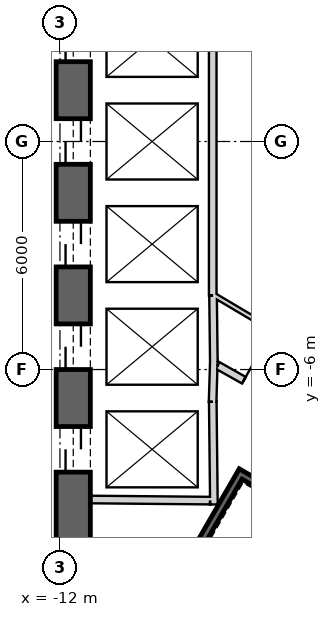
"""IFC4 building model, lengths in metres.
Left out: names, types, materials, properties, quantities, classifications, styles, units other than length and angle.
Written with IfcOpenShell. Run it as: python <this file> out.ifc"""

import sys

from ifc_helpers import new_model, si_unit, direction, frame, frame_2d, origin, place, context, subcontext, project, spatial, rectangle, extrude, element, fill, save


model = new_model("IFC4")
c1 = context("Model", 3, precision=1e-05, world=origin(), true_north=direction((0.0, 1.0)))
c2 = subcontext(c1, "Body", "Model", "MODEL_VIEW")
j1 = project(units=[si_unit("LENGTHUNIT", "METRE"), si_unit("PLANEANGLEUNIT", "RADIAN")], contexts=[c1])
p1 = place(None, origin())
s1 = spatial("IfcSite", under=j1, at=p1, CompositionType="ELEMENT")
p2 = place(p1, origin())
s2 = spatial("IfcBuilding", under=s1, at=p2, CompositionType="ELEMENT")
p3 = place(p2, frame((0.0, 0.0, 265.2)))
s3 = spatial("IfcBuildingStorey", under=s2, at=p3, CompositionType="ELEMENT", Elevation=265.2)
p4 = place(p3, frame((19.475, 2.208, 0.0), z_axis=(0.0, 0.0, 1.0), x_axis=(-0.866028369851, 0.499994862586, 0.0)))
e1 = element("IfcWall", 1, at=p4, inside=s3, PredefinedType="SHEAR", context=c2, shape_type="SweptSolid", body=[
    extrude(rectangle(XDim=31.523, YDim=0.9, at=frame_2d((15.762, 0.0))), origin(), (0.0, 0.0, 1.0), 4.0),
])
p5 = place(p4, frame((7.062, 0.0, 0.0)))
e2 = element("IfcOpeningElement", 2, at=p5, cuts=e1, PredefinedType="OPENING", context=c2, shape_type="SweptSolid", body=[
    extrude(rectangle(XDim=1.2, YDim=2.4, at=frame_2d((0.6, 1.2))), frame((0.0, 0.46, 0.0), z_axis=(0.0, -1.0, 0.0), x_axis=(1.0, 0.0, 0.0)), (0.0, 0.0, 1.0), 0.92),
])
p6 = place(p4, frame((3.612, 0.0, 0.0)))
e3 = element("IfcOpeningElement", 3, at=p6, cuts=e1, PredefinedType="OPENING", context=c2, shape_type="SweptSolid", body=[
    extrude(rectangle(XDim=1.2, YDim=2.4, at=frame_2d((0.6, 1.2))), frame((0.0, 0.46, 0.0), z_axis=(0.0, -1.0, 0.0), x_axis=(1.0, 0.0, 0.0)), (0.0, 0.0, 1.0), 0.92),
])
p7 = place(p4, frame((26.712, 0.0, 0.0)))
e4 = element("IfcOpeningElement", 4, at=p7, cuts=e1, PredefinedType="OPENING", context=c2, shape_type="SweptSolid", body=[
    extrude(rectangle(XDim=1.2, YDim=2.4, at=frame_2d((0.6, 1.2))), frame((0.0, 0.46, 0.0), z_axis=(0.0, -1.0, 0.0), x_axis=(1.0, 0.0, 0.0)), (0.0, 0.0, 1.0), 0.92),
])
p8 = place(p3, frame((-11.65, 15.762, 0.0), z_axis=(0.0, 0.0, 1.0), x_axis=(0.0, -1.0, 0.0)))
e5 = element("IfcWall", 5, at=p8, inside=s3, PredefinedType="SHEAR", context=c2, shape_type="SweptSolid", body=[
    extrude(rectangle(XDim=31.523, YDim=0.9, at=frame_2d((15.762, 0.0))), origin(), (0.0, 0.0, 1.0), 4.0),
])
p9 = place(p8, frame((7.062, 0.0, 0.0)))
e6 = element("IfcOpeningElement", 6, at=p9, cuts=e5, PredefinedType="OPENING", context=c2, shape_type="SweptSolid", body=[
    extrude(rectangle(XDim=1.2, YDim=2.4, at=frame_2d((0.6, 1.2))), frame((0.0, 0.46, 0.0), z_axis=(0.0, -1.0, 0.0), x_axis=(1.0, 0.0, 0.0)), (0.0, 0.0, 1.0), 0.92),
])
p10 = place(p8, frame((9.762, 0.0, 0.0)))
e7 = element("IfcOpeningElement", 7, at=p10, cuts=e5, PredefinedType="OPENING", context=c2, shape_type="SweptSolid", body=[
    extrude(rectangle(XDim=1.2, YDim=2.4, at=frame_2d((0.6, 1.2))), frame((0.0, 0.46, 0.0), z_axis=(0.0, -1.0, 0.0), x_axis=(1.0, 0.0, 0.0)), (0.0, 0.0, 1.0), 0.92),
])
p11 = place(p8, frame((12.462, 0.0, 0.0)))
e8 = element("IfcOpeningElement", 8, at=p11, cuts=e5, PredefinedType="OPENING", context=c2, shape_type="SweptSolid", body=[
    extrude(rectangle(XDim=1.2, YDim=2.4, at=frame_2d((0.6, 1.2))), frame((0.0, 0.46, 0.0), z_axis=(0.0, -1.0, 0.0), x_axis=(1.0, 0.0, 0.0)), (0.0, 0.0, 1.0), 0.92),
])
p12 = place(p8, frame((15.162, 0.0, 0.0)))
e9 = element("IfcOpeningElement", 9, at=p12, cuts=e5, PredefinedType="OPENING", context=c2, shape_type="SweptSolid", body=[
    extrude(rectangle(XDim=1.2, YDim=2.4, at=frame_2d((0.6, 1.2))), frame((0.0, 0.46, 0.0), z_axis=(0.0, -1.0, 0.0), x_axis=(1.0, 0.0, 0.0)), (0.0, 0.0, 1.0), 0.92),
])
p13 = place(p8, frame((17.862, 0.0, 0.0)))
e10 = element("IfcOpeningElement", 10, at=p13, cuts=e5, PredefinedType="OPENING", context=c2, shape_type="SweptSolid", body=[
    extrude(rectangle(XDim=1.2, YDim=2.4, at=frame_2d((0.6, 1.2))), frame((0.0, 0.46, 0.0), z_axis=(0.0, -1.0, 0.0), x_axis=(1.0, 0.0, 0.0)), (0.0, 0.0, 1.0), 0.92),
])
p14 = place(p8, frame((20.562, 0.0, 0.0)))
e11 = element("IfcOpeningElement", 11, at=p14, cuts=e5, PredefinedType="OPENING", context=c2, shape_type="SweptSolid", body=[
    extrude(rectangle(XDim=1.2, YDim=2.4, at=frame_2d((0.6, 1.2))), frame((0.0, 0.46, 0.0), z_axis=(0.0, -1.0, 0.0), x_axis=(1.0, 0.0, 0.0)), (0.0, 0.0, 1.0), 0.92),
])
p15 = place(p8, frame((23.262, 0.0, 0.0)))
e12 = element("IfcOpeningElement", 12, at=p15, cuts=e5, PredefinedType="OPENING", context=c2, shape_type="SweptSolid", body=[
    extrude(rectangle(XDim=1.2, YDim=2.4, at=frame_2d((0.6, 1.2))), frame((0.0, 0.46, 0.0), z_axis=(0.0, -1.0, 0.0), x_axis=(1.0, 0.0, 0.0)), (0.0, 0.0, 1.0), 0.92),
])
p16 = place(p8, frame((3.612, 0.0, 0.0)))
e13 = element("IfcOpeningElement", 13, at=p16, cuts=e5, PredefinedType="OPENING", context=c2, shape_type="SweptSolid", body=[
    extrude(rectangle(XDim=1.2, YDim=2.4, at=frame_2d((0.6, 1.2))), frame((0.0, 0.46, 0.0), z_axis=(0.0, -1.0, 0.0), x_axis=(1.0, 0.0, 0.0)), (0.0, 0.0, 1.0), 0.92),
])
p17 = place(p8, frame((26.712, 0.0, 0.0)))
e14 = element("IfcOpeningElement", 14, at=p17, cuts=e5, PredefinedType="OPENING", context=c2, shape_type="SweptSolid", body=[
    extrude(rectangle(XDim=1.2, YDim=2.4, at=frame_2d((0.6, 1.2))), frame((0.0, 0.46, 0.0), z_axis=(0.0, -1.0, 0.0), x_axis=(1.0, 0.0, 0.0)), (0.0, 0.0, 1.0), 0.92),
])
p18 = place(p3, frame((-7.825, -17.97, 0.0), z_axis=(0.0, 0.0, 1.0), x_axis=(0.866028369851, 0.499994862586, 0.0)))
e15 = element("IfcWall", 15, at=p18, inside=s3, PredefinedType="SHEAR", context=c2, shape_type="SweptSolid", body=[
    extrude(rectangle(XDim=31.523, YDim=0.9, at=frame_2d((15.762, 0.0))), origin(), (0.0, 0.0, 1.0), 4.0),
])
p19 = place(p18, frame((7.062, 0.0, 0.0)))
e16 = element("IfcOpeningElement", 16, at=p19, cuts=e15, PredefinedType="OPENING", context=c2, shape_type="SweptSolid", body=[
    extrude(rectangle(XDim=1.2, YDim=2.4, at=frame_2d((0.6, 1.2))), frame((0.0, 0.46, 0.0), z_axis=(0.0, -1.0, 0.0), x_axis=(1.0, 0.0, 0.0)), (0.0, 0.0, 1.0), 0.92),
])
p20 = place(p18, frame((9.762, 0.0, 0.0)))
e17 = element("IfcOpeningElement", 17, at=p20, cuts=e15, PredefinedType="OPENING", context=c2, shape_type="SweptSolid", body=[
    extrude(rectangle(XDim=1.2, YDim=2.4, at=frame_2d((0.6, 1.2))), frame((0.0, 0.46, 0.0), z_axis=(0.0, -1.0, 0.0), x_axis=(1.0, 0.0, 0.0)), (0.0, 0.0, 1.0), 0.92),
])
p21 = place(p18, frame((12.462, 0.0, 0.0)))
e18 = element("IfcOpeningElement", 18, at=p21, cuts=e15, PredefinedType="OPENING", context=c2, shape_type="SweptSolid", body=[
    extrude(rectangle(XDim=1.2, YDim=2.4, at=frame_2d((0.6, 1.2))), frame((0.0, 0.46, 0.0), z_axis=(0.0, -1.0, 0.0), x_axis=(1.0, 0.0, 0.0)), (0.0, 0.0, 1.0), 0.92),
])
p22 = place(p18, frame((15.162, 0.0, 0.0)))
e19 = element("IfcOpeningElement", 19, at=p22, cuts=e15, PredefinedType="OPENING", context=c2, shape_type="SweptSolid", body=[
    extrude(rectangle(XDim=1.2, YDim=2.4, at=frame_2d((0.6, 1.2))), frame((0.0, 0.46, 0.0), z_axis=(0.0, -1.0, 0.0), x_axis=(1.0, 0.0, 0.0)), (0.0, 0.0, 1.0), 0.92),
])
p23 = place(p18, frame((17.862, 0.0, 0.0)))
e20 = element("IfcOpeningElement", 20, at=p23, cuts=e15, PredefinedType="OPENING", context=c2, shape_type="SweptSolid", body=[
    extrude(rectangle(XDim=1.2, YDim=2.4, at=frame_2d((0.6, 1.2))), frame((0.0, 0.46, 0.0), z_axis=(0.0, -1.0, 0.0), x_axis=(1.0, 0.0, 0.0)), (0.0, 0.0, 1.0), 0.92),
])
p24 = place(p18, frame((20.562, 0.0, 0.0)))
e21 = element("IfcOpeningElement", 21, at=p24, cuts=e15, PredefinedType="OPENING", context=c2, shape_type="SweptSolid", body=[
    extrude(rectangle(XDim=1.2, YDim=2.4, at=frame_2d((0.6, 1.2))), frame((0.0, 0.46, 0.0), z_axis=(0.0, -1.0, 0.0), x_axis=(1.0, 0.0, 0.0)), (0.0, 0.0, 1.0), 0.92),
])
p25 = place(p18, frame((26.712, 0.0, 0.0)))
e22 = element("IfcOpeningElement", 22, at=p25, cuts=e15, PredefinedType="OPENING", context=c2, shape_type="SweptSolid", body=[
    extrude(rectangle(XDim=1.2, YDim=2.4, at=frame_2d((0.6, 1.2))), frame((0.0, 0.46, 0.0), z_axis=(0.0, -1.0, 0.0), x_axis=(1.0, 0.0, 0.0)), (0.0, 0.0, 1.0), 0.92),
])
p26 = place(p18, frame((3.612, 0.0, 0.0)))
e23 = element("IfcOpeningElement", 23, at=p26, cuts=e15, PredefinedType="OPENING", context=c2, shape_type="SweptSolid", body=[
    extrude(rectangle(XDim=1.2, YDim=2.4, at=frame_2d((0.6, 1.2))), frame((0.0, 0.46, 0.0), z_axis=(0.0, -1.0, 0.0), x_axis=(1.0, 0.0, 0.0)), (0.0, 0.0, 1.0), 0.92),
])
p27 = place(p3, frame((-7.98, 4.05, 0.0), z_axis=(0.0, 0.0, 1.0), x_axis=(0.0, -1.0, 0.0)))
e24 = element("IfcWall", 24, at=p27, inside=s3, PredefinedType="PLUMBINGWALL", context=c2, shape_type="SweptSolid", body=[
    extrude(rectangle(XDim=8.1, YDim=0.2, at=frame_2d((4.05, 0.0))), origin(), (0.0, 0.0, 1.0), 3.7),
])
p28 = place(p3, frame((-7.95, -5.772, 0.0), z_axis=(0.0, 0.0, 1.0), x_axis=(-0.030803413295, -0.999525462272, 0.0)))
e25 = element("IfcWall", 25, at=p28, inside=s3, PredefinedType="PLUMBINGWALL", context=c2, shape_type="SweptSolid", body=[
    extrude(rectangle(XDim=1.078, YDim=0.2, at=frame_2d((0.539, 0.0))), origin(), (0.0, 0.0, 1.0), 3.7),
])
p29 = place(p3, frame((-7.971, -4.05, 0.0), z_axis=(0.0, 0.0, 1.0), x_axis=(0.012042535896, -0.999927486035, 0.0)))
e26 = element("IfcWall", 26, at=p29, inside=s3, PredefinedType="PLUMBINGWALL", context=c2, shape_type="SweptSolid", body=[
    extrude(rectangle(XDim=1.845, YDim=0.2, at=frame_2d((0.922, 0.0))), origin(), (0.0, 0.0, 1.0), 3.7),
])
p30 = place(p3, frame((-7.979, -6.85, 0.0), z_axis=(0.0, 0.0, 1.0), x_axis=(0.011121475088, -0.999938154483, 0.0)))
e27 = element("IfcWall", 27, at=p30, inside=s3, PredefinedType="PLUMBINGWALL", context=c2, shape_type="SweptSolid", body=[
    extrude(rectangle(XDim=2.7, YDim=0.2, at=frame_2d((1.35, 0.0))), origin(), (0.0, 0.0, 1.0), 3.7),
])
p31 = place(p3, frame((-8.05, -9.449, 0.0), z_axis=(0.0, 0.0, 1.0), x_axis=(-0.999957467379, 0.009222983926, 0.0)))
e28 = element("IfcWall", 28, at=p31, inside=s3, PredefinedType="PLUMBINGWALL", context=c2, shape_type="SweptSolid", body=[
    extrude(rectangle(XDim=3.15, YDim=0.2, at=frame_2d((1.575, 0.0))), origin(), (0.0, 0.0, 1.0), 3.7),
])
p32 = place(p3, frame((-7.196, -8.663, -0.3), z_axis=(0.0, 0.0, 1.0), x_axis=(-0.499997992926, -0.866026562566, 0.0)))
e29 = element("IfcWall", 29, at=p32, inside=s3, PredefinedType="SHEAR", context=c2, shape_type="SweptSolid", body=[
    extrude(rectangle(XDim=7.9, YDim=0.2, at=frame_2d((3.95, 0.0))), origin(), (0.0, 0.0, 1.0), 4.0),
])
p33 = place(p3, frame((-4.041, -10.599, -0.3), z_axis=(0.0, 0.0, 1.0), x_axis=(-0.866047807691, 0.499961193289, 0.0)))
e30 = element("IfcWall", 30, at=p33, inside=s3, PredefinedType="SHEAR", context=c2, shape_type="SweptSolid", body=[
    extrude(rectangle(XDim=3.6, YDim=0.2, at=frame_2d((1.8, 0.0))), origin(), (0.0, 0.0, 1.0), 4.0),
])
p34 = place(p33, frame((1.25, 0.0, 0.3)))
e31 = element("IfcOpeningElement", 31, at=p34, cuts=e30, PredefinedType="OPENING", context=c2, shape_type="SweptSolid", body=[
    extrude(rectangle(XDim=1.1, YDim=2.1, at=frame_2d((0.55, 1.05))), frame((0.0, 0.11, 0.0), z_axis=(0.0, -1.0, 0.0), x_axis=(1.0, 0.0, 0.0)), (0.0, 0.0, 1.0), 0.22),
])
p35 = place(p3, frame((-7.849, -5.894, 0.0), z_axis=(0.0, 0.0, 1.0), x_axis=(0.871363259478, -0.490638431059, 0.0)))
e32 = element("IfcWall", 32, at=p35, inside=s3, PredefinedType="PARTITIONING", context=c2, shape_type="SweptSolid", body=[
    extrude(rectangle(XDim=2.581, YDim=0.2, at=frame_2d((1.291, 0.0))), origin(), (0.0, 0.0, 1.0), 3.7),
])
p36 = place(p35, frame((0.791, 0.0, 0.0)))
e33 = element("IfcOpeningElement", 33, at=p36, cuts=e32, PredefinedType="OPENING", context=c2, shape_type="SweptSolid", body=[
    extrude(rectangle(XDim=1.0, YDim=2.1, at=frame_2d((0.5, 1.05))), frame((0.0, 0.11, 0.0), z_axis=(0.0, -1.0, 0.0), x_axis=(1.0, 0.0, 0.0)), (0.0, 0.0, 1.0), 0.22),
])
p37 = place(p3, frame((-7.95, -4.041, 0.0), z_axis=(0.0, 0.0, 1.0), x_axis=(0.860112457103, -0.510104461004, 0.0)))
e34 = element("IfcWall", 34, at=p37, inside=s3, PredefinedType="PARTITIONING", context=c2, shape_type="SweptSolid", body=[
    extrude(rectangle(XDim=2.104, YDim=0.12, at=frame_2d((1.052, 0.0))), origin(), (0.0, 0.0, 1.0), 3.7),
])
p38 = place(p36, origin())
e35 = element("IfcDoor", 35, at=p38, inside=s3, OperationType="SINGLE_SWING_RIGHT", PredefinedType="USERDEFINED", context=c2, shape_type="SweptSolid", body=[
    extrude(rectangle(XDim=1.0, YDim=2.1, at=frame_2d((0.5, 1.05))), frame((0.0, 0.025, 0.0), z_axis=(0.0, -1.0, 0.0), x_axis=(1.0, 0.0, 0.0)), (0.0, 0.0, 1.0), 0.05),
])
fill(e33, e35)
p39 = place(p11, origin())
e36 = element("IfcDoor", 36, at=p39, inside=s3, OperationType="SLIDING_TO_LEFT", PredefinedType="USERDEFINED", context=c2, shape_type="SweptSolid", body=[
    extrude(rectangle(XDim=1.2, YDim=2.4, at=frame_2d((0.6, 1.2))), frame((0.0, 0.025, 0.0), z_axis=(0.0, -1.0, 0.0), x_axis=(1.0, 0.0, 0.0)), (0.0, 0.0, 1.0), 0.05),
])
fill(e8, e36)
p40 = place(p12, origin())
e37 = element("IfcDoor", 37, at=p40, inside=s3, OperationType="SLIDING_TO_LEFT", PredefinedType="USERDEFINED", context=c2, shape_type="SweptSolid", body=[
    extrude(rectangle(XDim=1.2, YDim=2.4, at=frame_2d((0.6, 1.2))), frame((0.0, 0.025, 0.0), z_axis=(0.0, -1.0, 0.0), x_axis=(1.0, 0.0, 0.0)), (0.0, 0.0, 1.0), 0.05),
])
fill(e9, e37)
p41 = place(p13, origin())
e38 = element("IfcDoor", 38, at=p41, inside=s3, OperationType="SLIDING_TO_LEFT", PredefinedType="USERDEFINED", context=c2, shape_type="SweptSolid", body=[
    extrude(rectangle(XDim=1.2, YDim=2.4, at=frame_2d((0.6, 1.2))), frame((0.0, 0.025, 0.0), z_axis=(0.0, -1.0, 0.0), x_axis=(1.0, 0.0, 0.0)), (0.0, 0.0, 1.0), 0.05),
])
fill(e10, e38)
p42 = place(p14, origin())
e39 = element("IfcDoor", 39, at=p42, inside=s3, OperationType="SLIDING_TO_LEFT", PredefinedType="USERDEFINED", context=c2, shape_type="SweptSolid", body=[
    extrude(rectangle(XDim=1.2, YDim=2.4, at=frame_2d((0.6, 1.2))), frame((0.0, 0.025, 0.0), z_axis=(0.0, -1.0, 0.0), x_axis=(1.0, 0.0, 0.0)), (0.0, 0.0, 1.0), 0.05),
])
fill(e11, e39)
p43 = place(p15, origin())
e40 = element("IfcDoor", 40, at=p43, inside=s3, OperationType="SLIDING_TO_LEFT", PredefinedType="USERDEFINED", context=c2, shape_type="SweptSolid", body=[
    extrude(rectangle(XDim=1.2, YDim=2.4, at=frame_2d((0.6, 1.2))), frame((0.0, 0.025, 0.0), z_axis=(0.0, -1.0, 0.0), x_axis=(1.0, 0.0, 0.0)), (0.0, 0.0, 1.0), 0.05),
])
fill(e12, e40)
save(model, sys.argv[1])
